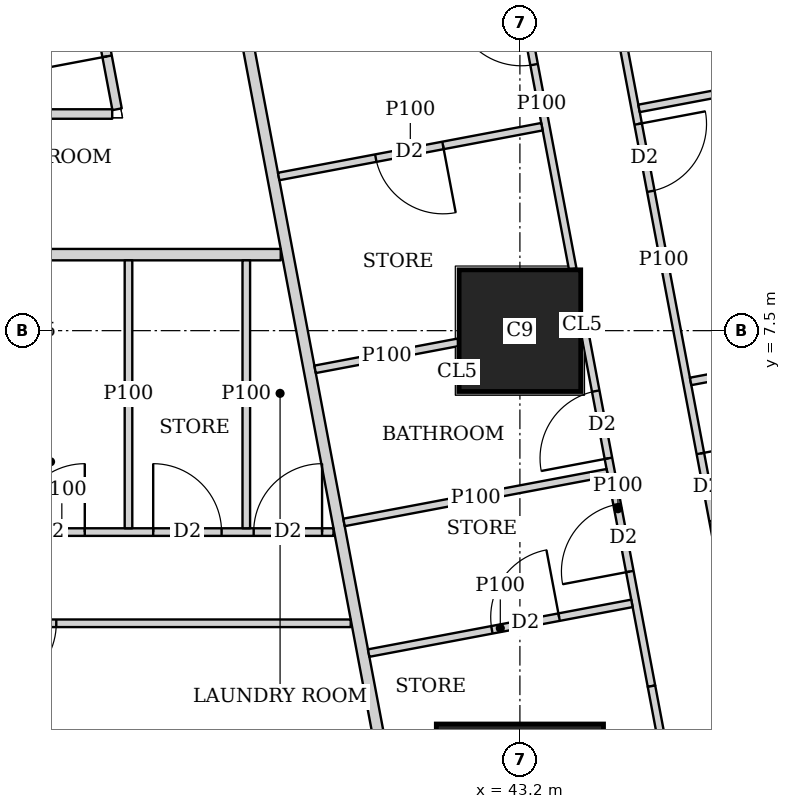
"""IFC4 building model, lengths in metres.
Left out: names, types, materials, properties, quantities, classifications, styles, units other than length and angle.
Written with IfcOpenShell. Run it as: python <this file> out.ifc"""

import sys

from ifc_helpers import new_model, si_unit, direction, frame, frame_2d, origin, origin_2d, place, context, subcontext, project, spatial, rectangle, extrude, element, fill, save


model = new_model("IFC4")
c1 = context("Model", 3, precision=1e-05, world=origin(), true_north=direction((0.0, 1.0)))
c2 = subcontext(c1, "Body", "Model", "MODEL_VIEW")
j1 = project(units=[si_unit("LENGTHUNIT", "METRE"), si_unit("PLANEANGLEUNIT", "RADIAN")], contexts=[c1])
p1 = place(None, origin())
s1 = spatial("IfcSite", under=j1, at=p1, CompositionType="ELEMENT")
p2 = place(p1, origin())
s2 = spatial("IfcBuilding", under=s1, at=p2, CompositionType="ELEMENT")
p3 = place(p2, frame((0.0, 0.0, 111.65)))
s3 = spatial("IfcBuildingStorey", under=s2, at=p3, CompositionType="ELEMENT", Elevation=111.65)
p4 = place(p3, frame((43.2, 1.225, 0.0), z_axis=(0.0, 0.0, 1.0), x_axis=(1.0, 0.0, 0.0)))
e1 = element("IfcColumn", 1, at=p4, inside=s3, PredefinedType="COLUMN", context=c2, shape_type="SweptSolid", body=[
    extrude(rectangle(XDim=2.2, YDim=2.2, at=origin_2d()), origin(), (0.0, 0.0, 1.0), 3.75),
])
p5 = place(p3, frame((43.2, 7.5, 0.0), z_axis=(0.0, 0.0, 1.0), x_axis=(1.0, 0.0, 0.0)))
e2 = element("IfcColumn", 2, at=p5, inside=s3, PredefinedType="COLUMN", context=c2, shape_type="SweptSolid", body=[
    extrude(rectangle(XDim=1.6, YDim=1.6, at=origin_2d()), origin(), (0.0, 0.0, 1.0), 3.75),
])
p6 = place(p3, frame((50.653, 2.703, 0.0), z_axis=(0.0, 0.0, 1.0), x_axis=(-0.185612026696, 0.982623109613, 0.0)))
e3 = element("IfcWall", 3, at=p6, inside=s3, PredefinedType="SOLIDWALL", context=c2, shape_type="SweptSolid", body=[
    extrude(rectangle(XDim=41.393, YDim=0.2, at=frame_2d((20.697, 0.0))), origin(), (0.0, 0.0, 1.0), 3.5),
])
p7 = place(p6, frame((1.633, 0.0, 0.9)))
e4 = element("IfcOpeningElement", 4, at=p7, cuts=e3, PredefinedType="OPENING", context=c2, shape_type="SweptSolid", body=[
    extrude(rectangle(XDim=1.8, YDim=1.5, at=frame_2d((0.9, 0.75))), frame((0.0, 0.11, 0.0), z_axis=(0.0, -1.0, 0.0), x_axis=(1.0, 0.0, 0.0)), (0.0, 0.0, 1.0), 0.22),
])
p8 = place(p6, frame((6.032, 0.0, 0.9)))
e5 = element("IfcOpeningElement", 5, at=p8, cuts=e3, PredefinedType="OPENING", context=c2, shape_type="SweptSolid", body=[
    extrude(rectangle(XDim=1.8, YDim=1.5, at=frame_2d((0.9, 0.75))), frame((0.0, 0.11, 0.0), z_axis=(0.0, -1.0, 0.0), x_axis=(1.0, 0.0, 0.0)), (0.0, 0.0, 1.0), 0.22),
])
p9 = place(p6, frame((9.848, 0.0, 0.9)))
e6 = element("IfcOpeningElement", 6, at=p9, cuts=e3, PredefinedType="OPENING", context=c2, shape_type="SweptSolid", body=[
    extrude(rectangle(XDim=1.8, YDim=1.5, at=frame_2d((0.9, 0.75))), frame((0.0, 0.11, 0.0), z_axis=(0.0, -1.0, 0.0), x_axis=(1.0, 0.0, 0.0)), (0.0, 0.0, 1.0), 0.22),
])
p10 = place(p6, frame((13.664, 0.0, 0.9)))
e7 = element("IfcOpeningElement", 7, at=p10, cuts=e3, PredefinedType="OPENING", context=c2, shape_type="SweptSolid", body=[
    extrude(rectangle(XDim=1.8, YDim=1.5, at=frame_2d((0.9, 0.75))), frame((0.0, 0.11, 0.0), z_axis=(0.0, -1.0, 0.0), x_axis=(1.0, 0.0, 0.0)), (0.0, 0.0, 1.0), 0.22),
])
p11 = place(p6, frame((17.481, 0.0, 0.9)))
e8 = element("IfcOpeningElement", 8, at=p11, cuts=e3, PredefinedType="OPENING", context=c2, shape_type="SweptSolid", body=[
    extrude(rectangle(XDim=1.8, YDim=1.5, at=frame_2d((0.9, 0.75))), frame((0.0, 0.11, 0.0), z_axis=(0.0, -1.0, 0.0), x_axis=(1.0, 0.0, 0.0)), (0.0, 0.0, 1.0), 0.22),
])
p12 = place(p6, frame((21.297, 0.0, 0.9)))
e9 = element("IfcOpeningElement", 9, at=p12, cuts=e3, PredefinedType="OPENING", context=c2, shape_type="SweptSolid", body=[
    extrude(rectangle(XDim=1.8, YDim=1.5, at=frame_2d((0.9, 0.75))), frame((0.0, 0.11, 0.0), z_axis=(0.0, -1.0, 0.0), x_axis=(1.0, 0.0, 0.0)), (0.0, 0.0, 1.0), 0.22),
])
p13 = place(p6, frame((25.113, 0.0, 0.9)))
e10 = element("IfcOpeningElement", 10, at=p13, cuts=e3, PredefinedType="OPENING", context=c2, shape_type="SweptSolid", body=[
    extrude(rectangle(XDim=1.8, YDim=1.5, at=frame_2d((0.9, 0.75))), frame((0.0, 0.11, 0.0), z_axis=(0.0, -1.0, 0.0), x_axis=(1.0, 0.0, 0.0)), (0.0, 0.0, 1.0), 0.22),
])
p14 = place(p6, frame((28.93, 0.0, 0.9)))
e11 = element("IfcOpeningElement", 11, at=p14, cuts=e3, PredefinedType="OPENING", context=c2, shape_type="SweptSolid", body=[
    extrude(rectangle(XDim=1.8, YDim=1.5, at=frame_2d((0.9, 0.75))), frame((0.0, 0.11, 0.0), z_axis=(0.0, -1.0, 0.0), x_axis=(1.0, 0.0, 0.0)), (0.0, 0.0, 1.0), 0.22),
])
p15 = place(p6, frame((32.746, 0.0, 0.9)))
e12 = element("IfcOpeningElement", 12, at=p15, cuts=e3, PredefinedType="OPENING", context=c2, shape_type="SweptSolid", body=[
    extrude(rectangle(XDim=1.8, YDim=1.5, at=frame_2d((0.9, 0.75))), frame((0.0, 0.11, 0.0), z_axis=(0.0, -1.0, 0.0), x_axis=(1.0, 0.0, 0.0)), (0.0, 0.0, 1.0), 0.22),
])
p16 = place(p6, frame((36.481, 0.0, 0.9)))
e13 = element("IfcOpeningElement", 13, at=p16, cuts=e3, PredefinedType="OPENING", context=c2, shape_type="SweptSolid", body=[
    extrude(rectangle(XDim=1.8, YDim=1.5, at=frame_2d((0.9, 0.75))), frame((0.0, 0.11, 0.0), z_axis=(0.0, -1.0, 0.0), x_axis=(1.0, 0.0, 0.0)), (0.0, 0.0, 1.0), 0.22),
])
p17 = place(p3, frame((40.053, 8.5, 0.0), z_axis=(0.0, 0.0, 1.0), x_axis=(-1.0, 0.0, 0.0)))
e14 = element("IfcWall", 14, at=p17, inside=s3, PredefinedType="SOLIDWALL", context=c2, shape_type="SweptSolid", body=[
    extrude(rectangle(XDim=31.703, YDim=0.15, at=frame_2d((15.852, 0.0))), origin(), (0.0, 0.0, 1.0), 3.5),
])
p18 = place(p17, frame((28.103, 0.0, 0.0)))
e15 = element("IfcOpeningElement", 15, at=p18, cuts=e14, PredefinedType="OPENING", context=c2, shape_type="SweptSolid", body=[
    extrude(rectangle(XDim=1.0, YDim=2.1, at=frame_2d((0.5, 1.05))), frame((0.0, 0.085, 0.0), z_axis=(0.0, -1.0, 0.0), x_axis=(1.0, 0.0, 0.0)), (0.0, 0.0, 1.0), 0.17),
])
p19 = place(p17, frame((19.754, 0.0, 0.0)))
e16 = element("IfcOpeningElement", 16, at=p19, cuts=e14, PredefinedType="OPENING", context=c2, shape_type="SweptSolid", body=[
    extrude(rectangle(XDim=1.0, YDim=2.1, at=frame_2d((0.5, 1.05))), frame((0.0, 0.085, 0.0), z_axis=(0.0, -1.0, 0.0), x_axis=(1.0, 0.0, 0.0)), (0.0, 0.0, 1.0), 0.17),
])
p20 = place(p17, frame((8.353, 0.0, 0.0)))
e17 = element("IfcOpeningElement", 17, at=p20, cuts=e14, PredefinedType="OPENING", context=c2, shape_type="SweptSolid", body=[
    extrude(rectangle(XDim=1.0, YDim=2.1, at=frame_2d((0.5, 1.05))), frame((0.0, 0.085, 0.0), z_axis=(0.0, -1.0, 0.0), x_axis=(1.0, 0.0, 0.0)), (0.0, 0.0, 1.0), 0.17),
])
p21 = place(p3, frame((33.127, 45.65, 0.0), z_axis=(0.0, 0.0, 1.0), x_axis=(0.185598547723, -0.98262565562, 0.0)))
e18 = element("IfcWall", 18, at=p21, inside=s3, PredefinedType="SOLIDWALL", context=c2, shape_type="SweptSolid", body=[
    extrude(rectangle(XDim=47.118, YDim=0.15, at=frame_2d((23.559, 0.0))), origin(), (0.0, 0.0, 1.0), 2.2),
])
p22 = place(p21, frame((20.373, 0.0, 0.0)))
e19 = element("IfcOpeningElement", 19, at=p22, cuts=e18, PredefinedType="OPENING", context=c2, shape_type="SweptSolid", body=[
    extrude(rectangle(XDim=1.0, YDim=2.1, at=frame_2d((0.5, 1.05))), frame((0.0, 0.085, 0.0), z_axis=(0.0, -1.0, 0.0), x_axis=(1.0, 0.0, 0.0)), (0.0, 0.0, 1.0), 0.17),
])
p23 = place(p21, frame((24.188, 0.0, 0.0)))
e20 = element("IfcOpeningElement", 20, at=p23, cuts=e18, PredefinedType="OPENING", context=c2, shape_type="SweptSolid", body=[
    extrude(rectangle(XDim=1.0, YDim=2.1, at=frame_2d((0.5, 1.05))), frame((0.0, 0.085, 0.0), z_axis=(0.0, -1.0, 0.0), x_axis=(1.0, 0.0, 0.0)), (0.0, 0.0, 1.0), 0.17),
])
p24 = place(p21, frame((32.608, 0.0, 0.0)))
e21 = element("IfcOpeningElement", 21, at=p24, cuts=e18, PredefinedType="OPENING", context=c2, shape_type="SweptSolid", body=[
    extrude(rectangle(XDim=1.0, YDim=2.1, at=frame_2d((0.5, 1.05))), frame((0.0, 0.085, 0.0), z_axis=(0.0, -1.0, 0.0), x_axis=(1.0, 0.0, 0.0)), (0.0, 0.0, 1.0), 0.17),
])
p25 = place(p3, frame((40.974, 3.65, 0.0), z_axis=(0.0, 0.0, 1.0), x_axis=(-1.0, 0.0, 0.0)))
e22 = element("IfcWall", 22, at=p25, inside=s3, PredefinedType="PARTITIONING", context=c2, shape_type="SweptSolid", body=[
    extrude(rectangle(XDim=8.574, YDim=0.1, at=frame_2d((4.287, 0.0))), origin(), (0.0, 0.0, 1.0), 3.5),
])
p26 = place(p25, frame((6.275, 0.0, 0.0)))
e23 = element("IfcOpeningElement", 23, at=p26, cuts=e22, PredefinedType="OPENING", context=c2, shape_type="SweptSolid", body=[
    extrude(rectangle(XDim=0.9, YDim=2.1, at=frame_2d((0.45, 1.05))), frame((0.0, 0.06, 0.0), z_axis=(0.0, -1.0, 0.0), x_axis=(1.0, 0.0, 0.0)), (0.0, 0.0, 1.0), 0.12),
])
p27 = place(p25, frame((3.874, 0.0, 0.0)))
e24 = element("IfcOpeningElement", 24, at=p27, cuts=e22, PredefinedType="OPENING", context=c2, shape_type="SweptSolid", body=[
    extrude(rectangle(XDim=0.9, YDim=2.1, at=frame_2d((0.45, 1.05))), frame((0.0, 0.06, 0.0), z_axis=(0.0, -1.0, 0.0), x_axis=(1.0, 0.0, 0.0)), (0.0, 0.0, 1.0), 0.12),
])
p28 = place(p3, frame((40.747, 4.85, 0.0), z_axis=(0.0, 0.0, 1.0), x_axis=(-1.0, 0.0, 0.0)))
e25 = element("IfcWall", 25, at=p28, inside=s3, PredefinedType="PARTITIONING", context=c2, shape_type="SweptSolid", body=[
    extrude(rectangle(XDim=7.148, YDim=0.1, at=frame_2d((3.574, 0.0))), origin(), (0.0, 0.0, 1.0), 3.5),
])
p29 = place(p28, frame((5.498, 0.0, 0.0)))
e26 = element("IfcOpeningElement", 26, at=p29, cuts=e25, PredefinedType="OPENING", context=c2, shape_type="SweptSolid", body=[
    extrude(rectangle(XDim=0.9, YDim=2.1, at=frame_2d((0.45, 1.05))), frame((0.0, 0.06, 0.0), z_axis=(0.0, -1.0, 0.0), x_axis=(1.0, 0.0, 0.0)), (0.0, 0.0, 1.0), 0.12),
])
p30 = place(p28, frame((3.272, 0.0, 0.0)))
e27 = element("IfcOpeningElement", 27, at=p30, cuts=e25, PredefinedType="OPENING", context=c2, shape_type="SweptSolid", body=[
    extrude(rectangle(XDim=0.9, YDim=2.1, at=frame_2d((0.45, 1.05))), frame((0.0, 0.06, 0.0), z_axis=(0.0, -1.0, 0.0), x_axis=(1.0, 0.0, 0.0)), (0.0, 0.0, 1.0), 0.12),
])
p31 = place(p28, frame((0.15, 0.0, 0.0)))
e28 = element("IfcOpeningElement", 28, at=p31, cuts=e25, PredefinedType="OPENING", context=c2, shape_type="SweptSolid", body=[
    extrude(rectangle(XDim=0.9, YDim=2.1, at=frame_2d((0.45, 1.05))), frame((0.0, 0.06, 0.0), z_axis=(0.0, -1.0, 0.0), x_axis=(1.0, 0.0, 0.0)), (0.0, 0.0, 1.0), 0.12),
])
p32 = place(p28, frame((1.472, 0.0, 0.0)))
e29 = element("IfcOpeningElement", 29, at=p32, cuts=e25, PredefinedType="OPENING", context=c2, shape_type="SweptSolid", body=[
    extrude(rectangle(XDim=0.9, YDim=2.1, at=frame_2d((0.45, 1.05))), frame((0.0, 0.06, 0.0), z_axis=(0.0, -1.0, 0.0), x_axis=(1.0, 0.0, 0.0)), (0.0, 0.0, 1.0), 0.12),
])
for number, where, z_axis, x_axis in (
    (30, (39.6, 4.9, 0.0), (0.0, 0.0, 1.0), (0.0, 1.0, 0.0)),
    (31, (38.05, 4.9, 0.0), (0.0, 0.0, 1.0), (0.0, 1.0, 0.0)),
):
    element("IfcWall", number, at=place(p3, frame(where, z_axis=z_axis, x_axis=x_axis)), inside=s3, PredefinedType="PARTITIONING", context=c2, shape_type="SweptSolid", body=[
        extrude(rectangle(XDim=3.525, YDim=0.1, at=frame_2d((1.763, 0.0))), origin(), (0.0, 0.0, 1.0), 3.5),
    ])
p33 = place(p3, frame((44.08, 13.794, 0.0), z_axis=(0.0, 0.0, 1.0), x_axis=(0.185608455357, -0.982623784212, 0.0)))
e32 = element("IfcWall", 32, at=p33, inside=s3, PredefinedType="PARTITIONING", context=c2, shape_type="SweptSolid", body=[
    extrude(rectangle(XDim=10.909, YDim=0.1, at=frame_2d((5.455, 0.0))), origin(), (0.0, 0.0, 1.0), 3.5),
])
p34 = place(p33, frame((1.094, 0.0, 0.0)))
e33 = element("IfcOpeningElement", 33, at=p34, cuts=e32, PredefinedType="OPENING", context=c2, shape_type="SweptSolid", body=[
    extrude(rectangle(XDim=0.9, YDim=2.1, at=frame_2d((0.45, 1.05))), frame((0.0, 0.06, 0.0), z_axis=(0.0, -1.0, 0.0), x_axis=(1.0, 0.0, 0.0)), (0.0, 0.0, 1.0), 0.12),
])
p35 = place(p33, frame((3.639, 0.0, 0.0)))
e34 = element("IfcOpeningElement", 34, at=p35, cuts=e32, PredefinedType="OPENING", context=c2, shape_type="SweptSolid", body=[
    extrude(rectangle(XDim=0.9, YDim=2.1, at=frame_2d((0.45, 1.05))), frame((0.0, 0.06, 0.0), z_axis=(0.0, -1.0, 0.0), x_axis=(1.0, 0.0, 0.0)), (0.0, 0.0, 1.0), 0.12),
])
p36 = place(p33, frame((8.05, 0.0, 0.0)))
e35 = element("IfcOpeningElement", 35, at=p36, cuts=e32, PredefinedType="OPENING", context=c2, shape_type="SweptSolid", body=[
    extrude(rectangle(XDim=0.9, YDim=2.1, at=frame_2d((0.45, 1.05))), frame((0.0, 0.06, 0.0), z_axis=(0.0, -1.0, 0.0), x_axis=(1.0, 0.0, 0.0)), (0.0, 0.0, 1.0), 0.12),
])
p37 = place(p3, frame((43.076, 12.644, 0.0), z_axis=(0.0, 0.0, 1.0), x_axis=(0.185705350074, -0.982605476757, 0.0)))
e36 = element("IfcWall", 36, at=p37, inside=s3, PredefinedType="PARTITIONING", context=c2, shape_type="SweptSolid", body=[
    extrude(rectangle(XDim=4.411, YDim=0.1, at=frame_2d((2.205, 0.0))), origin(), (0.0, 0.0, 1.0), 3.5),
])
p38 = place(p37, frame((0.773, 0.0, 0.0)))
e37 = element("IfcOpeningElement", 37, at=p38, cuts=e36, PredefinedType="OPENING", context=c2, shape_type="SweptSolid", body=[
    extrude(rectangle(XDim=0.9, YDim=2.1, at=frame_2d((0.45, 1.05))), frame((0.0, 0.06, 0.0), z_axis=(0.0, -1.0, 0.0), x_axis=(1.0, 0.0, 0.0)), (0.0, 0.0, 1.0), 0.12),
])
p39 = place(p3, frame((44.049, 7.491, 0.0), z_axis=(0.0, 0.0, 1.0), x_axis=(0.185628828844, -0.982619935632, 0.0)))
e38 = element("IfcWall", 38, at=p39, inside=s3, PredefinedType="PARTITIONING", context=c2, shape_type="SweptSolid", body=[
    extrude(rectangle(XDim=4.75, YDim=0.1, at=frame_2d((2.375, 0.0))), origin(), (0.0, 0.0, 1.0), 3.5),
])
p40 = place(p39, frame((0.8, 0.0, 0.0)))
e39 = element("IfcOpeningElement", 39, at=p40, cuts=e38, PredefinedType="OPENING", context=c2, shape_type="SweptSolid", body=[
    extrude(rectangle(XDim=0.9, YDim=2.1, at=frame_2d((0.45, 1.05))), frame((0.0, 0.06, 0.0), z_axis=(0.0, -1.0, 0.0), x_axis=(1.0, 0.0, 0.0)), (0.0, 0.0, 1.0), 0.12),
])
p41 = place(p39, frame((2.316, 0.0, 0.0)))
e40 = element("IfcOpeningElement", 40, at=p41, cuts=e38, PredefinedType="OPENING", context=c2, shape_type="SweptSolid", body=[
    extrude(rectangle(XDim=0.9, YDim=2.1, at=frame_2d((0.45, 1.05))), frame((0.0, 0.06, 0.0), z_axis=(0.0, -1.0, 0.0), x_axis=(1.0, 0.0, 0.0)), (0.0, 0.0, 1.0), 0.12),
])
p42 = place(p3, frame((44.931, 2.823, 0.0), z_axis=(0.0, 0.0, 1.0), x_axis=(0.185631845838, -0.982619365681, 0.0)))
e41 = element("IfcWall", 41, at=p42, inside=s3, PredefinedType="PARTITIONING", context=c2, shape_type="SweptSolid", body=[
    extrude(rectangle(XDim=2.403, YDim=0.1, at=frame_2d((1.201, 0.0))), origin(), (0.0, 0.0, 1.0), 2.05),
])
p43 = place(p3, frame((48.943, 11.213, 0.0), z_axis=(0.0, 0.0, 1.0), x_axis=(-0.982623519589, -0.185609856287, 0.0)))
e42 = element("IfcWall", 42, at=p43, inside=s3, PredefinedType="PARTITIONING", context=c2, shape_type="SweptSolid", body=[
    extrude(rectangle(XDim=4.25, YDim=0.1, at=frame_2d((2.125, 0.0))), origin(), (0.0, 0.0, 1.0), 2.2),
])
p44 = place(p3, frame((46.62, 7.053, 0.0), z_axis=(0.0, 0.0, 1.0), x_axis=(-0.982749355621, -0.18494243436, 0.0)))
e43 = element("IfcWall", 43, at=p44, inside=s3, PredefinedType="PARTITIONING", context=c2, shape_type="SweptSolid", body=[
    extrude(rectangle(XDim=1.195, YDim=0.1, at=frame_2d((0.597, 0.0))), origin(), (0.0, 0.0, 1.0), 2.05),
])
p45 = place(p3, frame((43.49, 10.183, 0.0), z_axis=(0.0, 0.0, 1.0), x_axis=(-0.982588017646, -0.185797706064, 0.0)))
e44 = element("IfcWall", 44, at=p45, inside=s3, PredefinedType="PARTITIONING", context=c2, shape_type="SweptSolid", body=[
    extrude(rectangle(XDim=3.525, YDim=0.1, at=frame_2d((1.763, 0.0))), origin(), (0.0, 0.0, 1.0), 3.5),
])
p46 = place(p45, frame((1.325, 0.0, 0.0)))
e45 = element("IfcOpeningElement", 45, at=p46, cuts=e44, PredefinedType="OPENING", context=c2, shape_type="SweptSolid", body=[
    extrude(rectangle(XDim=0.9, YDim=2.1, at=frame_2d((0.45, 1.05))), frame((0.0, 0.06, 0.0), z_axis=(0.0, -1.0, 0.0), x_axis=(1.0, 0.0, 0.0)), (0.0, 0.0, 1.0), 0.12),
])
p47 = place(p3, frame((42.39, 7.347, 0.0), z_axis=(0.0, 0.0, 1.0), x_axis=(-0.982633642782, -0.185556255819, 0.0)))
e46 = element("IfcWall", 46, at=p47, inside=s3, PredefinedType="PARTITIONING", context=c2, shape_type="SweptSolid", body=[
    extrude(rectangle(XDim=1.918, YDim=0.1, at=frame_2d((0.959, 0.0))), origin(), (0.0, 0.0, 1.0), 3.5),
])
p48 = place(p3, frame((44.35, 5.631, 0.0), z_axis=(0.0, 0.0, 1.0), x_axis=(-0.982638553676, -0.185530247748, 0.0)))
e47 = element("IfcWall", 47, at=p48, inside=s3, PredefinedType="PARTITIONING", context=c2, shape_type="SweptSolid", body=[
    extrude(rectangle(XDim=3.525, YDim=0.1, at=frame_2d((1.763, 0.0))), origin(), (0.0, 0.0, 1.0), 3.5),
])
p49 = place(p3, frame((41.21, 3.258, 0.0), z_axis=(0.0, 0.0, 1.0), x_axis=(0.982638553676, 0.185530247748, 0.0)))
e48 = element("IfcWall", 48, at=p49, inside=s3, PredefinedType="PARTITIONING", context=c2, shape_type="SweptSolid", body=[
    extrude(rectangle(XDim=3.525, YDim=0.1, at=frame_2d((1.763, 0.0))), origin(), (0.0, 0.0, 1.0), 3.5),
])
p50 = place(p49, frame((1.65, 0.0, 0.0)))
e49 = element("IfcOpeningElement", 49, at=p50, cuts=e48, PredefinedType="OPENING", context=c2, shape_type="SweptSolid", body=[
    extrude(rectangle(XDim=0.9, YDim=2.1, at=frame_2d((0.45, 1.05))), frame((0.0, 0.06, 0.0), z_axis=(0.0, -1.0, 0.0), x_axis=(1.0, 0.0, 0.0)), (0.0, 0.0, 1.0), 0.12),
])
p51 = place(p3, frame((28.95, 10.35, 0.0), z_axis=(0.0, 0.0, 1.0), x_axis=(1.0, 0.0, 0.0)))
e50 = element("IfcWall", 50, at=p51, inside=s3, PredefinedType="PARTITIONING", context=c2, shape_type="SweptSolid", body=[
    extrude(rectangle(XDim=8.886, YDim=0.125, at=frame_2d((4.443, 0.0))), origin(), (0.0, 0.0, 1.0), 3.5),
])
p52 = place(p3, frame((37.9, 10.413, 0.0), z_axis=(0.0, 0.0, 1.0), x_axis=(-0.185513629891, 0.982641691119, 0.0)))
e51 = element("IfcWall", 51, at=p52, inside=s3, PredefinedType="PARTITIONING", context=c2, shape_type="SweptSolid", body=[
    extrude(rectangle(XDim=4.668, YDim=0.125, at=frame_2d((2.334, 0.0))), origin(), (0.0, 0.0, 1.0), 3.5),
])
p53 = place(p52, frame((0.708, 0.0, 0.0)))
e52 = element("IfcOpeningElement", 52, at=p53, cuts=e51, PredefinedType="OPENING", context=c2, shape_type="SweptSolid", body=[
    extrude(rectangle(XDim=1.0, YDim=2.1, at=frame_2d((0.5, 1.05))), frame((0.0, 0.073, 0.0), z_axis=(0.0, -1.0, 0.0), x_axis=(1.0, 0.0, 0.0)), (0.0, 0.0, 1.0), 0.145),
])
p54 = place(p27, origin())
e53 = element("IfcDoor", 53, at=p54, inside=s3, OperationType="SINGLE_SWING_RIGHT", PredefinedType="DOOR", context=c2, shape_type="SweptSolid", body=[
    extrude(rectangle(XDim=0.9, YDim=2.1, at=frame_2d((0.45, 1.05))), frame((0.0, 0.025, 0.0), z_axis=(0.0, -1.0, 0.0), x_axis=(1.0, 0.0, 0.0)), (0.0, 0.0, 1.0), 0.05),
])
fill(e24, e53)
p55 = place(p30, origin())
e54 = element("IfcDoor", 54, at=p55, inside=s3, OperationType="SINGLE_SWING_RIGHT", PredefinedType="DOOR", context=c2, shape_type="SweptSolid", body=[
    extrude(rectangle(XDim=0.9, YDim=2.1, at=frame_2d((0.45, 1.05))), frame((0.0, 0.025, 0.0), z_axis=(0.0, -1.0, 0.0), x_axis=(1.0, 0.0, 0.0)), (0.0, 0.0, 1.0), 0.05),
])
fill(e27, e54)
p56 = place(p31, origin())
e55 = element("IfcDoor", 55, at=p56, inside=s3, OperationType="SINGLE_SWING_RIGHT", PredefinedType="DOOR", context=c2, shape_type="SweptSolid", body=[
    extrude(rectangle(XDim=0.9, YDim=2.1, at=frame_2d((0.45, 1.05))), frame((0.0, 0.025, 0.0), z_axis=(0.0, -1.0, 0.0), x_axis=(1.0, 0.0, 0.0)), (0.0, 0.0, 1.0), 0.05),
])
fill(e28, e55)
p57 = place(p32, origin())
e56 = element("IfcDoor", 56, at=p57, inside=s3, OperationType="SINGLE_SWING_LEFT", PredefinedType="DOOR", context=c2, shape_type="SweptSolid", body=[
    extrude(rectangle(XDim=0.9, YDim=2.1, at=frame_2d((0.45, 1.05))), frame((0.0, 0.025, 0.0), z_axis=(0.0, -1.0, 0.0), x_axis=(1.0, 0.0, 0.0)), (0.0, 0.0, 1.0), 0.05),
])
fill(e29, e56)
p58 = place(p35, origin())
e57 = element("IfcDoor", 57, at=p58, inside=s3, OperationType="SINGLE_SWING_LEFT", PredefinedType="DOOR", context=c2, shape_type="SweptSolid", body=[
    extrude(rectangle(XDim=0.9, YDim=2.1, at=frame_2d((0.45, 1.05))), frame((0.0, 0.025, 0.0), z_axis=(0.0, -1.0, 0.0), x_axis=(1.0, 0.0, 0.0)), (0.0, 0.0, 1.0), 0.05),
])
fill(e34, e57)
p59 = place(p36, origin())
e58 = element("IfcDoor", 58, at=p59, inside=s3, OperationType="SINGLE_SWING_LEFT", PredefinedType="DOOR", context=c2, shape_type="SweptSolid", body=[
    extrude(rectangle(XDim=0.9, YDim=2.1, at=frame_2d((0.45, 1.05))), frame((0.0, 0.025, 0.0), z_axis=(0.0, -1.0, 0.0), x_axis=(1.0, 0.0, 0.0)), (0.0, 0.0, 1.0), 0.05),
])
fill(e35, e58)
p60 = place(p38, origin())
e59 = element("IfcDoor", 59, at=p60, inside=s3, OperationType="SINGLE_SWING_RIGHT", PredefinedType="DOOR", context=c2, shape_type="SweptSolid", body=[
    extrude(rectangle(XDim=0.9, YDim=2.1, at=frame_2d((0.45, 1.05))), frame((0.0, 0.025, 0.0), z_axis=(0.0, -1.0, 0.0), x_axis=(1.0, 0.0, 0.0)), (0.0, 0.0, 1.0), 0.05),
])
fill(e37, e59)
p61 = place(p40, origin())
e60 = element("IfcDoor", 60, at=p61, inside=s3, OperationType="SINGLE_SWING_LEFT", PredefinedType="DOOR", context=c2, shape_type="SweptSolid", body=[
    extrude(rectangle(XDim=0.9, YDim=2.1, at=frame_2d((0.45, 1.05))), frame((0.0, 0.025, 0.0), z_axis=(0.0, -1.0, 0.0), x_axis=(1.0, 0.0, 0.0)), (0.0, 0.0, 1.0), 0.05),
])
fill(e39, e60)
p62 = place(p41, origin())
e61 = element("IfcDoor", 61, at=p62, inside=s3, OperationType="SINGLE_SWING_LEFT", PredefinedType="DOOR", context=c2, shape_type="SweptSolid", body=[
    extrude(rectangle(XDim=0.9, YDim=2.1, at=frame_2d((0.45, 1.05))), frame((0.0, 0.025, 0.0), z_axis=(0.0, -1.0, 0.0), x_axis=(1.0, 0.0, 0.0)), (0.0, 0.0, 1.0), 0.05),
])
fill(e40, e61)
p63 = place(p46, origin())
e62 = element("IfcDoor", 62, at=p63, inside=s3, OperationType="SINGLE_SWING_LEFT", PredefinedType="DOOR", context=c2, shape_type="SweptSolid", body=[
    extrude(rectangle(XDim=0.9, YDim=2.1, at=frame_2d((0.45, 1.05))), frame((0.0, 0.025, 0.0), z_axis=(0.0, -1.0, 0.0), x_axis=(1.0, 0.0, 0.0)), (0.0, 0.0, 1.0), 0.05),
])
fill(e45, e62)
p64 = place(p50, origin())
e63 = element("IfcDoor", 63, at=p64, inside=s3, OperationType="SINGLE_SWING_RIGHT", PredefinedType="DOOR", context=c2, shape_type="SweptSolid", body=[
    extrude(rectangle(XDim=0.9, YDim=2.1, at=frame_2d((0.45, 1.05))), frame((0.0, 0.025, 0.0), z_axis=(0.0, -1.0, 0.0), x_axis=(1.0, 0.0, 0.0)), (0.0, 0.0, 1.0), 0.05),
])
fill(e49, e63)
p65 = place(p53, origin())
e64 = element("IfcDoor", 64, at=p65, inside=s3, OperationType="SINGLE_SWING_LEFT", PredefinedType="DOOR", context=c2, shape_type="SweptSolid", body=[
    extrude(rectangle(XDim=1.0, YDim=2.1, at=frame_2d((0.5, 1.05))), frame((0.0, 0.025, 0.0), z_axis=(0.0, -1.0, 0.0), x_axis=(1.0, 0.0, 0.0)), (0.0, 0.0, 1.0), 0.05),
])
fill(e52, e64)
save(model, sys.argv[1])
